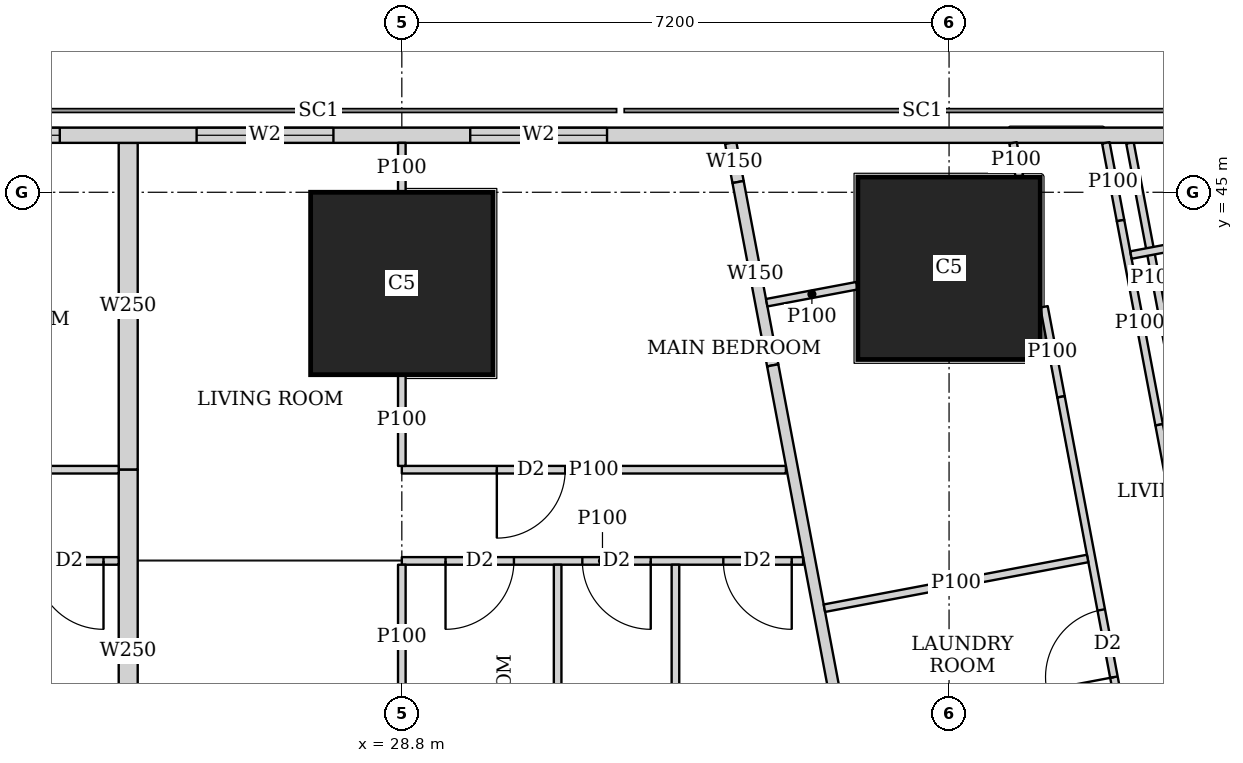
"""IFC4 building model, lengths in metres.
Left out: names, types, materials, properties, quantities, classifications, styles, units other than length and angle.
Written with IfcOpenShell. Run it as: python <this file> out.ifc"""

import sys

from ifc_helpers import new_model, si_unit, direction, frame, frame_2d, origin, origin_2d, place, context, subcontext, project, spatial, rectangle, extrude, element, fill, save


model = new_model("IFC4")
c1 = context("Model", 3, precision=1e-05, world=origin(), true_north=direction((0.0, 1.0)))
c2 = subcontext(c1, "Body", "Model", "MODEL_VIEW")
j1 = project(units=[si_unit("LENGTHUNIT", "METRE"), si_unit("PLANEANGLEUNIT", "RADIAN")], contexts=[c1])
p1 = place(None, origin())
s1 = spatial("IfcSite", under=j1, at=p1, CompositionType="ELEMENT")
p2 = place(p1, origin())
s2 = spatial("IfcBuilding", under=s1, at=p2, CompositionType="ELEMENT")
p3 = place(p2, frame((0.0, 0.0, 208.7)))
s3 = spatial("IfcBuildingStorey", under=s2, at=p3, CompositionType="ELEMENT", Elevation=208.7)
for number, where, z_axis, x_axis in (
    (1, (28.8, 43.8, 0.0), (0.0, 0.0, 1.0), (1.0, 0.0, 0.0)),
    (2, (36.0, 44.0, 0.0), (0.0, 0.0, 1.0), (1.0, 0.0, 0.0)),
):
    element("IfcColumn", number, at=place(p3, frame(where, z_axis=z_axis, x_axis=x_axis)), inside=s3, PredefinedType="COLUMN", context=c2, shape_type="SweptSolid", body=[
        extrude(rectangle(XDim=2.4, YDim=2.4, at=origin_2d()), origin(), (0.0, 0.0, 1.0), 3.75),
    ])
p4 = place(p3, frame((40.106, 45.75, 0.0), z_axis=(0.0, 0.0, 1.0), x_axis=(-1.0, 0.0, 0.0)))
e3 = element("IfcWall", 3, at=p4, inside=s3, PredefinedType="SOLIDWALL", context=c2, shape_type="SweptSolid", body=[
    extrude(rectangle(XDim=32.743, YDim=0.2, at=frame_2d((16.372, 0.0))), origin(), (0.0, 0.0, 1.0), 3.5),
])
p5 = place(p4, frame((8.606, 0.0, 0.9)))
e4 = element("IfcOpeningElement", 4, at=p5, cuts=e3, PredefinedType="OPENING", context=c2, shape_type="SweptSolid", body=[
    extrude(rectangle(XDim=1.8, YDim=1.5, at=frame_2d((0.9, 0.75))), frame((0.0, 0.11, 0.0), z_axis=(0.0, -1.0, 0.0), x_axis=(1.0, 0.0, 0.0)), (0.0, 0.0, 1.0), 0.22),
])
p6 = place(p4, frame((12.206, 0.0, 0.9)))
e5 = element("IfcOpeningElement", 5, at=p6, cuts=e3, PredefinedType="OPENING", context=c2, shape_type="SweptSolid", body=[
    extrude(rectangle(XDim=1.8, YDim=1.5, at=frame_2d((0.9, 0.75))), frame((0.0, 0.11, 0.0), z_axis=(0.0, -1.0, 0.0), x_axis=(1.0, 0.0, 0.0)), (0.0, 0.0, 1.0), 0.22),
])
p7 = place(p4, frame((15.806, 0.0, 0.9)))
e6 = element("IfcOpeningElement", 6, at=p7, cuts=e3, PredefinedType="OPENING", context=c2, shape_type="SweptSolid", body=[
    extrude(rectangle(XDim=1.8, YDim=1.5, at=frame_2d((0.9, 0.75))), frame((0.0, 0.11, 0.0), z_axis=(0.0, -1.0, 0.0), x_axis=(1.0, 0.0, 0.0)), (0.0, 0.0, 1.0), 0.22),
])
p8 = place(p4, frame((19.406, 0.0, 0.9)))
e7 = element("IfcOpeningElement", 7, at=p8, cuts=e3, PredefinedType="OPENING", context=c2, shape_type="SweptSolid", body=[
    extrude(rectangle(XDim=1.8, YDim=1.5, at=frame_2d((0.9, 0.75))), frame((0.0, 0.11, 0.0), z_axis=(0.0, -1.0, 0.0), x_axis=(1.0, 0.0, 0.0)), (0.0, 0.0, 1.0), 0.22),
])
p9 = place(p4, frame((23.006, 0.0, 0.9)))
e8 = element("IfcOpeningElement", 8, at=p9, cuts=e3, PredefinedType="OPENING", context=c2, shape_type="SweptSolid", body=[
    extrude(rectangle(XDim=1.8, YDim=1.5, at=frame_2d((0.9, 0.75))), frame((0.0, 0.11, 0.0), z_axis=(0.0, -1.0, 0.0), x_axis=(1.0, 0.0, 0.0)), (0.0, 0.0, 1.0), 0.22),
])
p10 = place(p4, frame((28.025, 0.0, 0.9)))
e9 = element("IfcOpeningElement", 9, at=p10, cuts=e3, PredefinedType="OPENING", context=c2, shape_type="SweptSolid", body=[
    extrude(rectangle(XDim=2.4, YDim=1.5, at=frame_2d((1.2, 0.75))), frame((0.0, 0.11, 0.0), z_axis=(0.0, -1.0, 0.0), x_axis=(1.0, 0.0, 0.0)), (0.0, 0.0, 1.0), 0.22),
])
p11 = place(p3, frame((33.127, 45.65, 0.0), z_axis=(0.0, 0.0, 1.0), x_axis=(0.185441815104, -0.982655246366, 0.0)))
e10 = element("IfcWall", 10, at=p11, inside=s3, PredefinedType="SOLIDWALL", context=c2, shape_type="SweptSolid", body=[
    extrude(rectangle(XDim=0.524, YDim=0.15, at=frame_2d((0.262, 0.0))), origin(), (0.0, 0.0, 1.0), 3.5),
])
p12 = place(p3, frame((33.224, 45.135, 0.0), z_axis=(0.0, 0.0, 1.0), x_axis=(0.185681462868, -0.982609990967, 0.0)))
e11 = element("IfcWall", 11, at=p12, inside=s3, PredefinedType="SOLIDWALL", context=c2, shape_type="SweptSolid", body=[
    extrude(rectangle(XDim=2.455, YDim=0.15, at=frame_2d((1.228, 0.0))), origin(), (0.0, 0.0, 1.0), 2.05),
])
p13 = place(p3, frame((33.68, 42.723, 0.0), z_axis=(0.0, 0.0, 1.0), x_axis=(0.185601160014, -0.982625162207, 0.0)))
e12 = element("IfcWall", 12, at=p13, inside=s3, PredefinedType="SOLIDWALL", context=c2, shape_type="SweptSolid", body=[
    extrude(rectangle(XDim=41.051, YDim=0.15, at=frame_2d((20.526, 0.0))), origin(), (0.0, 0.0, 1.0), 2.5),
])
p14 = place(p13, frame((12.307, 0.0, 0.0)))
e13 = element("IfcOpeningElement", 13, at=p14, cuts=e12, PredefinedType="OPENING", context=c2, shape_type="SweptSolid", body=[
    extrude(rectangle(XDim=1.0, YDim=2.1, at=frame_2d((0.5, 1.05))), frame((0.0, 0.085, 0.0), z_axis=(0.0, -1.0, 0.0), x_axis=(1.0, 0.0, 0.0)), (0.0, 0.0, 1.0), 0.17),
])
p15 = place(p13, frame((16.123, 0.0, 0.0)))
e14 = element("IfcOpeningElement", 14, at=p15, cuts=e12, PredefinedType="OPENING", context=c2, shape_type="SweptSolid", body=[
    extrude(rectangle(XDim=1.0, YDim=2.1, at=frame_2d((0.5, 1.05))), frame((0.0, 0.085, 0.0), z_axis=(0.0, -1.0, 0.0), x_axis=(1.0, 0.0, 0.0)), (0.0, 0.0, 1.0), 0.17),
])
p16 = place(p13, frame((30.902, 0.0, 0.0)))
e15 = element("IfcOpeningElement", 15, at=p16, cuts=e12, PredefinedType="OPENING", context=c2, shape_type="SweptSolid", body=[
    extrude(rectangle(XDim=1.0, YDim=2.1, at=frame_2d((0.5, 1.05))), frame((0.0, 0.085, 0.0), z_axis=(0.0, -1.0, 0.0), x_axis=(1.0, 0.0, 0.0)), (0.0, 0.0, 1.0), 0.17),
])
p17 = place(p3, frame((39.054, 42.085, 0.0), z_axis=(0.0, 0.0, 1.0), x_axis=(-0.185791584218, 0.982589175207, 0.0)))
e16 = element("IfcWall", 16, at=p17, inside=s3, PredefinedType="PARTITIONING", context=c2, shape_type="SweptSolid", body=[
    extrude(rectangle(XDim=3.628, YDim=0.1, at=frame_2d((1.814, 0.0))), origin(), (0.0, 0.0, 1.0), 2.05),
])
p18 = place(p3, frame((38.063, 45.65, 0.0), z_axis=(0.0, 0.0, 1.0), x_axis=(0.185677287841, -0.982610779902, 0.0)))
e17 = element("IfcWall", 17, at=p18, inside=s3, PredefinedType="PARTITIONING", context=c2, shape_type="SweptSolid", body=[
    extrude(rectangle(XDim=1.04, YDim=0.1, at=frame_2d((0.52, 0.0))), origin(), (0.0, 0.0, 1.0), 3.5),
])
p19 = place(p3, frame((38.256, 44.628, 0.0), z_axis=(0.0, 0.0, 1.0), x_axis=(0.185700639943, -0.982606366927, 0.0)))
e18 = element("IfcWall", 18, at=p19, inside=s3, PredefinedType="PARTITIONING", context=c2, shape_type="SweptSolid", body=[
    extrude(rectangle(XDim=2.735, YDim=0.1, at=frame_2d((1.367, 0.0))), origin(), (0.0, 0.0, 1.0), 2.05),
])
p20 = place(p3, frame((38.764, 41.941, 0.0), z_axis=(0.0, 0.0, 1.0), x_axis=(0.185548572312, -0.982635093671, 0.0)))
e19 = element("IfcWall", 19, at=p20, inside=s3, PredefinedType="PARTITIONING", context=c2, shape_type="SweptSolid", body=[
    extrude(rectangle(XDim=9.135, YDim=0.1, at=frame_2d((4.568, 0.0))), origin(), (0.0, 0.0, 1.0), 3.5),
])
p21 = place(p20, frame((8.085, 0.0, 0.0)))
e20 = element("IfcOpeningElement", 20, at=p21, cuts=e19, PredefinedType="OPENING", context=c2, shape_type="SweptSolid", body=[
    extrude(rectangle(XDim=0.9, YDim=2.1, at=frame_2d((0.45, 1.05))), frame((0.0, 0.06, 0.0), z_axis=(0.0, -1.0, 0.0), x_axis=(1.0, 0.0, 0.0)), (0.0, 0.0, 1.0), 0.12),
])
p22 = place(p20, frame((3.7, 0.0, 0.0)))
e21 = element("IfcOpeningElement", 21, at=p22, cuts=e19, PredefinedType="OPENING", context=c2, shape_type="SweptSolid", body=[
    extrude(rectangle(XDim=0.9, YDim=2.1, at=frame_2d((0.45, 1.05))), frame((0.0, 0.06, 0.0), z_axis=(0.0, -1.0, 0.0), x_axis=(1.0, 0.0, 0.0)), (0.0, 0.0, 1.0), 0.12),
])
p23 = place(p3, frame((36.842, 45.65, 0.0), z_axis=(0.0, 0.0, 1.0), x_axis=(0.185407859198, -0.982661653748, 0.0)))
e22 = element("IfcWall", 22, at=p23, inside=s3, PredefinedType="PARTITIONING", context=c2, shape_type="SweptSolid", body=[
    extrude(rectangle(XDim=0.448, YDim=0.1, at=frame_2d((0.224, 0.0))), origin(), (0.0, 0.0, 1.0), 3.5),
])
p24 = place(p3, frame((37.249, 43.493, 0.0), z_axis=(0.0, 0.0, 1.0), x_axis=(0.185817643817, -0.982584247404, 0.0)))
e23 = element("IfcWall", 23, at=p24, inside=s3, PredefinedType="PARTITIONING", context=c2, shape_type="SweptSolid", body=[
    extrude(rectangle(XDim=1.205, YDim=0.1, at=frame_2d((0.603, 0.0))), origin(), (0.0, 0.0, 1.0), 2.05),
])
p25 = place(p3, frame((37.473, 42.309, 0.0), z_axis=(0.0, 0.0, 1.0), x_axis=(0.185491912953, -0.982645790827, 0.0)))
e24 = element("IfcWall", 24, at=p25, inside=s3, PredefinedType="PARTITIONING", context=c2, shape_type="SweptSolid", body=[
    extrude(rectangle(XDim=9.737, YDim=0.1, at=frame_2d((4.869, 0.0))), origin(), (0.0, 0.0, 1.0), 3.5),
])
p26 = place(p25, frame((8.312, 0.0, 0.0)))
e25 = element("IfcOpeningElement", 25, at=p26, cuts=e24, PredefinedType="OPENING", context=c2, shape_type="SweptSolid", body=[
    extrude(rectangle(XDim=0.9, YDim=2.1, at=frame_2d((0.45, 1.05))), frame((0.0, 0.06, 0.0), z_axis=(0.0, -1.0, 0.0), x_axis=(1.0, 0.0, 0.0)), (0.0, 0.0, 1.0), 0.12),
])
p27 = place(p25, frame((2.853, 0.0, 0.0)))
e26 = element("IfcOpeningElement", 26, at=p27, cuts=e24, PredefinedType="OPENING", context=c2, shape_type="SweptSolid", body=[
    extrude(rectangle(XDim=0.9, YDim=2.1, at=frame_2d((0.45, 1.05))), frame((0.0, 0.06, 0.0), z_axis=(0.0, -1.0, 0.0), x_axis=(1.0, 0.0, 0.0)), (0.0, 0.0, 1.0), 0.12),
])
p28 = place(p25, frame((5.644, 0.0, 0.0)))
e27 = element("IfcOpeningElement", 27, at=p28, cuts=e24, PredefinedType="OPENING", context=c2, shape_type="SweptSolid", body=[
    extrude(rectangle(XDim=0.9, YDim=2.1, at=frame_2d((0.45, 1.05))), frame((0.0, 0.06, 0.0), z_axis=(0.0, -1.0, 0.0), x_axis=(1.0, 0.0, 0.0)), (0.0, 0.0, 1.0), 0.12),
])
p29 = place(p3, frame((41.968, 44.85, 0.0), z_axis=(0.0, 0.0, 1.0), x_axis=(-0.98258614234, -0.185807623311, 0.0)))
e28 = element("IfcWall", 28, at=p29, inside=s3, PredefinedType="PARTITIONING", context=c2, shape_type="SweptSolid", body=[
    extrude(rectangle(XDim=3.638, YDim=0.1, at=frame_2d((1.819, 0.0))), origin(), (0.0, 0.0, 1.0), 2.05),
])
p30 = place(p3, frame((34.79, 43.771, 0.0), z_axis=(0.0, 0.0, 1.0), x_axis=(-0.982730261052, -0.18504387051, 0.0)))
e29 = element("IfcWall", 29, at=p30, inside=s3, PredefinedType="PARTITIONING", context=c2, shape_type="SweptSolid", body=[
    extrude(rectangle(XDim=1.21, YDim=0.1, at=frame_2d((0.605, 0.0))), origin(), (0.0, 0.0, 1.0), 2.05),
])
p31 = place(p3, frame((37.823, 40.182, 0.0), z_axis=(0.0, 0.0, 1.0), x_axis=(-0.98263926043, -0.185526504472, 0.0)))
e30 = element("IfcWall", 30, at=p31, inside=s3, PredefinedType="PARTITIONING", context=c2, shape_type="SweptSolid", body=[
    extrude(rectangle(XDim=3.524, YDim=0.1, at=frame_2d((1.762, 0.0))), origin(), (0.0, 0.0, 1.0), 3.5),
])
p32 = place(p3, frame((21.6, 41.35, 0.0), z_axis=(0.0, 0.0, 1.0), x_axis=(1.0, 0.0, 0.0)))
e31 = element("IfcWall", 31, at=p32, inside=s3, PredefinedType="PARTITIONING", context=c2, shape_type="SweptSolid", body=[
    extrude(rectangle(XDim=3.475, YDim=0.1, at=frame_2d((1.737, 0.0))), origin(), (0.0, 0.0, 1.0), 3.5),
])
p33 = place(p32, frame((0.2, 0.0, 0.0)))
e32 = element("IfcOpeningElement", 32, at=p33, cuts=e31, PredefinedType="OPENING", context=c2, shape_type="SweptSolid", body=[
    extrude(rectangle(XDim=0.9, YDim=2.1, at=frame_2d((0.45, 1.05))), frame((0.0, 0.06, 0.0), z_axis=(0.0, -1.0, 0.0), x_axis=(1.0, 0.0, 0.0)), (0.0, 0.0, 1.0), 0.12),
])
p34 = place(p3, frame((21.6, 40.15, 0.0), z_axis=(0.0, 0.0, 1.0), x_axis=(1.0, 0.0, 0.0)))
e33 = element("IfcWall", 33, at=p34, inside=s3, PredefinedType="PARTITIONING", context=c2, shape_type="SweptSolid", body=[
    extrude(rectangle(XDim=3.475, YDim=0.1, at=frame_2d((1.737, 0.0))), origin(), (0.0, 0.0, 1.0), 3.5),
])
p35 = place(p34, frame((0.575, 0.0, 0.0)))
e34 = element("IfcOpeningElement", 34, at=p35, cuts=e33, PredefinedType="OPENING", context=c2, shape_type="SweptSolid", body=[
    extrude(rectangle(XDim=0.9, YDim=2.1, at=frame_2d((0.45, 1.05))), frame((0.0, 0.06, 0.0), z_axis=(0.0, -1.0, 0.0), x_axis=(1.0, 0.0, 0.0)), (0.0, 0.0, 1.0), 0.12),
])
p36 = place(p34, frame((2.375, 0.0, 0.0)))
e35 = element("IfcOpeningElement", 35, at=p36, cuts=e33, PredefinedType="OPENING", context=c2, shape_type="SweptSolid", body=[
    extrude(rectangle(XDim=0.9, YDim=2.1, at=frame_2d((0.45, 1.05))), frame((0.0, 0.06, 0.0), z_axis=(0.0, -1.0, 0.0), x_axis=(1.0, 0.0, 0.0)), (0.0, 0.0, 1.0), 0.12),
])
p37 = place(p3, frame((28.8, 41.35, 0.0), z_axis=(0.0, 0.0, 1.0), x_axis=(1.0, 0.0, 0.0)))
e36 = element("IfcWall", 36, at=p37, inside=s3, PredefinedType="PARTITIONING", context=c2, shape_type="SweptSolid", body=[
    extrude(rectangle(XDim=5.053, YDim=0.1, at=frame_2d((2.526, 0.0))), origin(), (0.0, 0.0, 1.0), 3.5),
])
p38 = place(p37, frame((1.25, 0.0, 0.0)))
e37 = element("IfcOpeningElement", 37, at=p38, cuts=e36, PredefinedType="OPENING", context=c2, shape_type="SweptSolid", body=[
    extrude(rectangle(XDim=0.9, YDim=2.1, at=frame_2d((0.45, 1.05))), frame((0.0, 0.06, 0.0), z_axis=(0.0, -1.0, 0.0), x_axis=(1.0, 0.0, 0.0)), (0.0, 0.0, 1.0), 0.12),
])
p39 = place(p3, frame((28.8, 40.15, 0.0), z_axis=(0.0, 0.0, 1.0), x_axis=(1.0, 0.0, 0.0)))
e38 = element("IfcWall", 38, at=p39, inside=s3, PredefinedType="PARTITIONING", context=c2, shape_type="SweptSolid", body=[
    extrude(rectangle(XDim=5.28, YDim=0.1, at=frame_2d((2.64, 0.0))), origin(), (0.0, 0.0, 1.0), 3.5),
])
p40 = place(p39, frame((0.575, 0.0, 0.0)))
e39 = element("IfcOpeningElement", 39, at=p40, cuts=e38, PredefinedType="OPENING", context=c2, shape_type="SweptSolid", body=[
    extrude(rectangle(XDim=0.9, YDim=2.1, at=frame_2d((0.45, 1.05))), frame((0.0, 0.06, 0.0), z_axis=(0.0, -1.0, 0.0), x_axis=(1.0, 0.0, 0.0)), (0.0, 0.0, 1.0), 0.12),
])
p41 = place(p39, frame((4.23, 0.0, 0.0)))
e40 = element("IfcOpeningElement", 40, at=p41, cuts=e38, PredefinedType="OPENING", context=c2, shape_type="SweptSolid", body=[
    extrude(rectangle(XDim=0.9, YDim=2.1, at=frame_2d((0.45, 1.05))), frame((0.0, 0.06, 0.0), z_axis=(0.0, -1.0, 0.0), x_axis=(1.0, 0.0, 0.0)), (0.0, 0.0, 1.0), 0.12),
])
p42 = place(p39, frame((2.375, 0.0, 0.0)))
e41 = element("IfcOpeningElement", 41, at=p42, cuts=e38, PredefinedType="OPENING", context=c2, shape_type="SweptSolid", body=[
    extrude(rectangle(XDim=0.9, YDim=2.1, at=frame_2d((0.45, 1.05))), frame((0.0, 0.06, 0.0), z_axis=(0.0, -1.0, 0.0), x_axis=(1.0, 0.0, 0.0)), (0.0, 0.0, 1.0), 0.12),
])
p43 = place(p3, frame((28.8, 41.4, 0.0), z_axis=(0.0, 0.0, 1.0), x_axis=(0.0, 1.0, 0.0)))
e42 = element("IfcWall", 42, at=p43, inside=s3, PredefinedType="PARTITIONING", context=c2, shape_type="SweptSolid", body=[
    extrude(rectangle(XDim=1.199, YDim=0.1, at=frame_2d((0.6, 0.0))), origin(), (0.0, 0.0, 1.0), 3.5),
])
p44 = place(p3, frame((28.8, 45.001, 0.0), z_axis=(0.0, 0.0, 1.0), x_axis=(0.0, 1.0, 0.0)))
e43 = element("IfcWall", 43, at=p44, inside=s3, PredefinedType="PARTITIONING", context=c2, shape_type="SweptSolid", body=[
    extrude(rectangle(XDim=0.649, YDim=0.1, at=frame_2d((0.324, 0.0))), origin(), (0.0, 0.0, 1.0), 3.5),
])
p45 = place(p3, frame((28.8, 38.201, 0.0), z_axis=(0.0, 0.0, 1.0), x_axis=(0.0, 1.0, 0.0)))
e44 = element("IfcWall", 44, at=p45, inside=s3, PredefinedType="PARTITIONING", context=c2, shape_type="SweptSolid", body=[
    extrude(rectangle(XDim=1.899, YDim=0.1, at=frame_2d((0.95, 0.0))), origin(), (0.0, 0.0, 1.0), 3.5),
])
for number, where, z_axis, x_axis in (
    (45, (32.4, 36.575, 0.0), (0.0, 0.0, 1.0), (0.0, 1.0, 0.0)),
    (46, (30.85, 36.575, 0.0), (0.0, 0.0, 1.0), (0.0, 1.0, 0.0)),
):
    element("IfcWall", number, at=place(p3, frame(where, z_axis=z_axis, x_axis=x_axis)), inside=s3, PredefinedType="PARTITIONING", context=c2, shape_type="SweptSolid", body=[
        extrude(rectangle(XDim=3.525, YDim=0.1, at=frame_2d((1.763, 0.0))), origin(), (0.0, 0.0, 1.0), 3.5),
    ])
p46 = place(p3, frame((25.2, 41.35, 0.0), z_axis=(0.0, 0.0, 1.0), x_axis=(0.0, 1.0, 0.0)))
e47 = element("IfcWall", 47, at=p46, inside=s3, PredefinedType="SOLIDWALL", context=c2, shape_type="SweptSolid", body=[
    extrude(rectangle(XDim=4.3, YDim=0.25, at=frame_2d((2.15, 0.0))), origin(), (0.0, 0.0, 1.0), 2.05),
])
p47 = place(p3, frame((25.2, 36.575, 0.0), z_axis=(0.0, 0.0, 1.0), x_axis=(0.0, 1.0, 0.0)))
e48 = element("IfcWall", 48, at=p47, inside=s3, PredefinedType="SOLIDWALL", context=c2, shape_type="SweptSolid", body=[
    extrude(rectangle(XDim=4.775, YDim=0.25, at=frame_2d((2.388, 0.0))), origin(), (0.0, 0.0, 1.0), 3.5),
])
p48 = place(p5, origin())
e49 = element("IfcWindow", 49, at=p48, inside=s3, PartitioningType="SINGLE_PANEL", PredefinedType="WINDOW", context=c2, shape_type="SweptSolid", body=[
    extrude(rectangle(XDim=1.8, YDim=1.5, at=frame_2d((0.9, 0.75))), frame((0.0, 0.03, 0.0), z_axis=(0.0, -1.0, 0.0), x_axis=(1.0, 0.0, 0.0)), (0.0, 0.0, 1.0), 0.06),
])
fill(e4, e49)
p49 = place(p6, origin())
e50 = element("IfcWindow", 50, at=p49, inside=s3, PartitioningType="SINGLE_PANEL", PredefinedType="WINDOW", context=c2, shape_type="SweptSolid", body=[
    extrude(rectangle(XDim=1.8, YDim=1.5, at=frame_2d((0.9, 0.75))), frame((0.0, 0.03, 0.0), z_axis=(0.0, -1.0, 0.0), x_axis=(1.0, 0.0, 0.0)), (0.0, 0.0, 1.0), 0.06),
])
fill(e5, e50)
p50 = place(p7, origin())
e51 = element("IfcWindow", 51, at=p50, inside=s3, PartitioningType="SINGLE_PANEL", PredefinedType="WINDOW", context=c2, shape_type="SweptSolid", body=[
    extrude(rectangle(XDim=1.8, YDim=1.5, at=frame_2d((0.9, 0.75))), frame((0.0, 0.03, 0.0), z_axis=(0.0, -1.0, 0.0), x_axis=(1.0, 0.0, 0.0)), (0.0, 0.0, 1.0), 0.06),
])
fill(e6, e51)
p51 = place(p27, origin())
e52 = element("IfcDoor", 52, at=p51, inside=s3, OperationType="SINGLE_SWING_LEFT", PredefinedType="DOOR", context=c2, shape_type="SweptSolid", body=[
    extrude(rectangle(XDim=0.9, YDim=2.1, at=frame_2d((0.45, 1.05))), frame((0.0, 0.025, 0.0), z_axis=(0.0, -1.0, 0.0), x_axis=(1.0, 0.0, 0.0)), (0.0, 0.0, 1.0), 0.05),
])
fill(e26, e52)
p52 = place(p36, origin())
e53 = element("IfcDoor", 53, at=p52, inside=s3, OperationType="SINGLE_SWING_LEFT", PredefinedType="DOOR", context=c2, shape_type="SweptSolid", body=[
    extrude(rectangle(XDim=0.9, YDim=2.1, at=frame_2d((0.45, 1.05))), frame((0.0, 0.025, 0.0), z_axis=(0.0, -1.0, 0.0), x_axis=(1.0, 0.0, 0.0)), (0.0, 0.0, 1.0), 0.05),
])
fill(e35, e53)
p53 = place(p38, origin())
e54 = element("IfcDoor", 54, at=p53, inside=s3, OperationType="SINGLE_SWING_RIGHT", PredefinedType="DOOR", context=c2, shape_type="SweptSolid", body=[
    extrude(rectangle(XDim=0.9, YDim=2.1, at=frame_2d((0.45, 1.05))), frame((0.0, 0.025, 0.0), z_axis=(0.0, -1.0, 0.0), x_axis=(1.0, 0.0, 0.0)), (0.0, 0.0, 1.0), 0.05),
])
fill(e37, e54)
p54 = place(p40, origin())
e55 = element("IfcDoor", 55, at=p54, inside=s3, OperationType="SINGLE_SWING_RIGHT", PredefinedType="DOOR", context=c2, shape_type="SweptSolid", body=[
    extrude(rectangle(XDim=0.9, YDim=2.1, at=frame_2d((0.45, 1.05))), frame((0.0, 0.025, 0.0), z_axis=(0.0, -1.0, 0.0), x_axis=(1.0, 0.0, 0.0)), (0.0, 0.0, 1.0), 0.05),
])
fill(e39, e55)
p55 = place(p41, origin())
e56 = element("IfcDoor", 56, at=p55, inside=s3, OperationType="SINGLE_SWING_LEFT", PredefinedType="DOOR", context=c2, shape_type="SweptSolid", body=[
    extrude(rectangle(XDim=0.9, YDim=2.1, at=frame_2d((0.45, 1.05))), frame((0.0, 0.025, 0.0), z_axis=(0.0, -1.0, 0.0), x_axis=(1.0, 0.0, 0.0)), (0.0, 0.0, 1.0), 0.05),
])
fill(e40, e56)
p56 = place(p42, origin())
e57 = element("IfcDoor", 57, at=p56, inside=s3, OperationType="SINGLE_SWING_LEFT", PredefinedType="DOOR", context=c2, shape_type="SweptSolid", body=[
    extrude(rectangle(XDim=0.9, YDim=2.1, at=frame_2d((0.45, 1.05))), frame((0.0, 0.025, 0.0), z_axis=(0.0, -1.0, 0.0), x_axis=(1.0, 0.0, 0.0)), (0.0, 0.0, 1.0), 0.05),
])
fill(e41, e57)
save(model, sys.argv[1])
